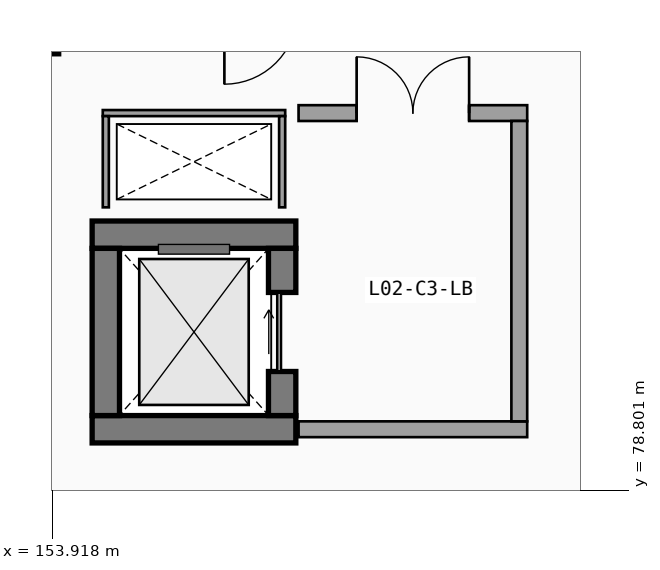
"""IFC4 building model, lengths in metres.
Left out: names, types, materials, properties, quantities, classifications, styles, units other than length and angle.
Written with IfcOpenShell. Run it as: python <this file> out.ifc"""

import sys

from ifc_helpers import new_model, si_unit, direction, frame, frame_2d, origin, origin_2d, place, context, subcontext, project, spatial, rectangle, extrude, element, fill, save


model = new_model("IFC4")
c1 = context("Model", 3, precision=1e-05, world=origin(), true_north=direction((0.0, 1.0)))
c2 = subcontext(c1, "Body", "Model", "MODEL_VIEW")
j1 = project(units=[si_unit("LENGTHUNIT", "METRE"), si_unit("PLANEANGLEUNIT", "RADIAN")], contexts=[c1])
p1 = place(None, origin())
s1 = spatial("IfcSite", under=j1, at=p1, CompositionType="ELEMENT")
p2 = place(p1, origin())
s2 = spatial("IfcBuilding", under=s1, at=p2, CompositionType="ELEMENT")
p3 = place(p2, frame((0.0, 0.0, 9.6)))
s3 = spatial("IfcBuildingStorey", under=s2, at=p3, CompositionType="ELEMENT", Elevation=9.6)
p4 = place(p3, frame((153.6, 86.4, 0.0), z_axis=(0.0, 0.0, 1.0), x_axis=(1.0, 0.0, 0.0)))
e1 = element("IfcColumn", 1, at=p4, inside=s3, PredefinedType="COLUMN", context=c2, shape_type="SweptSolid", body=[
    extrude(rectangle(XDim=0.85, YDim=0.85, at=origin_2d()), origin(), (0.0, 0.0, 1.0), 4.5),
])
for number, where, z_axis, x_axis in (
    (2, (154.575, 79.8, 0.0), (0.0, 0.0, 1.0), (1.0, 0.0, 0.0)),
    (3, (157.925, 83.0, 0.0), (0.0, 0.0, 1.0), (-1.0, 0.0, 0.0)),
):
    element("IfcWall", number, at=place(p3, frame(where, z_axis=z_axis, x_axis=x_axis)), inside=s3, PredefinedType="SHEAR", context=c2, shape_type="SweptSolid", body=[
        extrude(rectangle(XDim=3.35, YDim=0.45, at=frame_2d((1.675, 0.0))), origin(), (0.0, 0.0, 1.0), 4.22),
    ])
p5 = place(p3, frame((154.8, 82.775, 0.0), z_axis=(0.0, 0.0, 1.0), x_axis=(0.0, -1.0, 0.0)))
e4 = element("IfcWall", 4, at=p5, inside=s3, PredefinedType="SHEAR", context=c2, shape_type="SweptSolid", body=[
    extrude(rectangle(XDim=2.75, YDim=0.45, at=frame_2d((1.375, 0.0))), origin(), (0.0, 0.0, 1.0), 4.22),
])
p6 = place(p3, frame((157.7, 80.025, 0.0), z_axis=(0.0, 0.0, 1.0), x_axis=(0.0, 1.0, 0.0)))
e5 = element("IfcWall", 5, at=p6, inside=s3, PredefinedType="SHEAR", context=c2, shape_type="SweptSolid", body=[
    extrude(rectangle(XDim=2.75, YDim=0.45, at=frame_2d((1.375, 0.0))), origin(), (0.0, 0.0, 1.0), 4.22),
])
p7 = place(p6, frame((0.725, 0.0, 0.0), z_axis=(0.0, 0.0, 1.0), x_axis=(1.0, 0.0, 0.0)))
e6 = element("IfcOpeningElement", 6, at=p7, cuts=e5, PredefinedType="OPENING", context=c2, shape_type="SweptSolid", body=[
    extrude(rectangle(XDim=1.3, YDim=2.25, at=frame_2d((0.65, 1.125))), frame((0.0, 0.235, 0.0), z_axis=(0.0, -1.0, 0.0), x_axis=(1.0, 0.0, 0.0)), (0.0, 0.0, 1.0), 0.47),
])
p8 = place(p3, frame((157.75, 85.0, 0.0), z_axis=(0.0, 0.0, 1.0), x_axis=(-1.0, 0.0, 0.0)))
e7 = element("IfcWall", 7, at=p8, inside=s3, PredefinedType="PARTITIONING", context=c2, shape_type="SweptSolid", body=[
    extrude(rectangle(XDim=3.0, YDim=0.1, at=frame_2d((1.5, 0.0))), origin(), (0.0, 0.0, 1.0), 4.22),
])
for number, where, z_axis, x_axis in (
    (8, (154.8, 84.95, 0.0), (0.0, 0.0, 1.0), (0.0, -1.0, 0.0)),
    (9, (157.7, 83.45, 0.0), (0.0, 0.0, 1.0), (0.0, 1.0, 0.0)),
):
    element("IfcWall", number, at=place(p3, frame(where, z_axis=z_axis, x_axis=x_axis)), inside=s3, PredefinedType="PARTITIONING", context=c2, shape_type="SweptSolid", body=[
        extrude(rectangle(XDim=1.5, YDim=0.1, at=frame_2d((0.75, 0.0))), origin(), (0.0, 0.0, 1.0), 4.22),
    ])
p9 = place(p3, frame((157.97, 79.8, 0.0), z_axis=(0.0, 0.0, 1.0), x_axis=(1.0, 0.0, 0.0)))
e10 = element("IfcWall", 10, at=p9, inside=s3, PredefinedType="SOLIDWALL", context=c2, shape_type="SweptSolid", body=[
    extrude(rectangle(XDim=3.76, YDim=0.26, at=frame_2d((1.88, 0.0))), origin(), (0.0, 0.0, 1.0), 4.22),
])
p10 = place(p3, frame((161.73, 85.0, 0.0), z_axis=(0.0, 0.0, 1.0), x_axis=(-1.0, 0.0, 0.0)))
e11 = element("IfcWall", 11, at=p10, inside=s3, PredefinedType="SOLIDWALL", context=c2, shape_type="SweptSolid", body=[
    extrude(rectangle(XDim=3.76, YDim=0.26, at=frame_2d((1.88, 0.0))), origin(), (0.0, 0.0, 1.0), 4.22),
])
p11 = place(p10, frame((2.805, 0.0, 0.0), z_axis=(0.0, 0.0, 1.0), x_axis=(-1.0, 0.0, 0.0)))
e12 = element("IfcOpeningElement", 12, at=p11, cuts=e11, PredefinedType="OPENING", context=c2, shape_type="SweptSolid", body=[
    extrude(rectangle(XDim=1.85, YDim=2.25, at=frame_2d((0.925, 1.125))), frame((0.0, 0.14, 0.0), z_axis=(0.0, -1.0, 0.0), x_axis=(1.0, 0.0, 0.0)), (0.0, 0.0, 1.0), 0.28),
])
p12 = place(p3, frame((161.6, 79.93, 0.0), z_axis=(0.0, 0.0, 1.0), x_axis=(0.0, 1.0, 0.0)))
e13 = element("IfcWall", 13, at=p12, inside=s3, PredefinedType="SOLIDWALL", context=c2, shape_type="SweptSolid", body=[
    extrude(rectangle(XDim=4.94, YDim=0.26, at=frame_2d((2.47, 0.0))), origin(), (0.0, 0.0, 1.0), 4.22),
])
p13 = place(p7, origin())
e14 = element("IfcDoor", 14, at=p13, inside=s3, OperationType="SLIDING_TO_RIGHT", PredefinedType="DOOR", context=c2, shape_type="SweptSolid", body=[
    extrude(rectangle(XDim=1.3, YDim=2.25, at=frame_2d((0.65, 1.125))), frame((0.0, 0.025, 0.0), z_axis=(0.0, -1.0, 0.0), x_axis=(1.0, 0.0, 0.0)), (0.0, 0.0, 1.0), 0.05),
])
fill(e6, e14)
p14 = place(p11, origin())
e15 = element("IfcDoor", 15, at=p14, inside=s3, OperationType="DOUBLE_DOOR_SINGLE_SWING", PredefinedType="DOOR", context=c2, shape_type="SweptSolid", body=[
    extrude(rectangle(XDim=1.85, YDim=2.25, at=frame_2d((0.925, 1.125))), frame((0.0, 0.025, 0.0), z_axis=(0.0, -1.0, 0.0), x_axis=(1.0, 0.0, 0.0)), (0.0, 0.0, 1.0), 0.05),
])
fill(e12, e15)
save(model, sys.argv[1])
